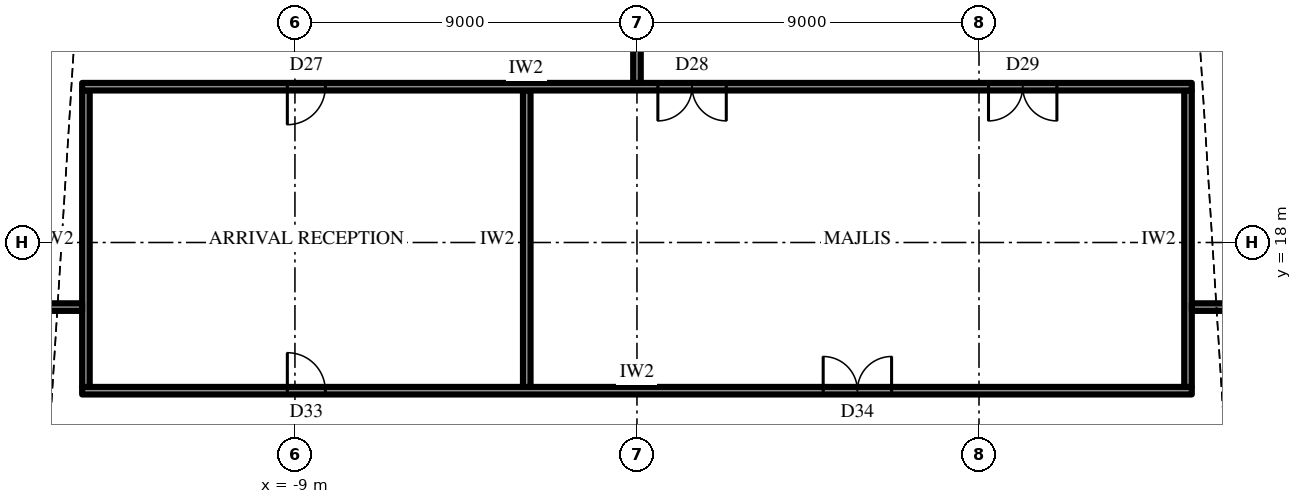
"""IFC4 building model, lengths in metres.
Left out: names, types, materials, properties, quantities, classifications, styles, units other than length and angle.
Written with IfcOpenShell. Run it as: python <this file> out.ifc"""

import sys

from ifc_helpers import new_model, si_unit, direction, frame, frame_2d, origin, place, context, subcontext, project, spatial, rectangle, extrude, element, fill, save


model = new_model("IFC4")
c1 = context("Model", 3, precision=1e-05, world=origin(), true_north=direction((0.0, 1.0)))
c2 = subcontext(c1, "Body", "Model", "MODEL_VIEW")
j1 = project(units=[si_unit("LENGTHUNIT", "METRE"), si_unit("PLANEANGLEUNIT", "RADIAN")], contexts=[c1])
p1 = place(None, origin())
s1 = spatial("IfcSite", under=j1, at=p1, CompositionType="ELEMENT")
p2 = place(p1, origin())
s2 = spatial("IfcBuilding", under=s1, at=p2, CompositionType="ELEMENT")
p3 = place(p2, frame((0.0, 0.0, 306.5)))
s3 = spatial("IfcBuildingStorey", under=s2, at=p3, CompositionType="ELEMENT", Elevation=306.5)
p4 = place(p3, frame((-14.6, 14.1, 0.0), z_axis=(0.0, 0.0, 1.0), x_axis=(1.0, 0.0, 0.0)))
e1 = element("IfcWall", 1, at=p4, inside=s3, PredefinedType="PARTITIONING", context=c2, shape_type="SweptSolid", body=[
    extrude(rectangle(XDim=29.2, YDim=0.2, at=frame_2d((14.6, 0.0))), origin(), (0.0, 0.0, 1.0), 4.8),
])
p5 = place(p4, frame((5.4, 0.0, 0.0)))
e2 = element("IfcOpeningElement", 2, at=p5, cuts=e1, PredefinedType="OPENING", context=c2, shape_type="SweptSolid", body=[
    extrude(rectangle(XDim=1.0, YDim=2.2, at=frame_2d((0.5, 1.1))), frame((0.0, 0.11, 0.0), z_axis=(0.0, -1.0, 0.0), x_axis=(1.0, 0.0, 0.0)), (0.0, 0.0, 1.0), 0.22),
])
p6 = place(p4, frame((19.5, 0.0, 0.0)))
e3 = element("IfcOpeningElement", 3, at=p6, cuts=e1, PredefinedType="OPENING", context=c2, shape_type="SweptSolid", body=[
    extrude(rectangle(XDim=1.8, YDim=2.4, at=frame_2d((0.9, 1.2))), frame((0.0, 0.11, 0.0), z_axis=(0.0, -1.0, 0.0), x_axis=(1.0, 0.0, 0.0)), (0.0, 0.0, 1.0), 0.22),
])
for number, where, z_axis, x_axis in (
    (4, (-14.5, 14.2, 0.0), (0.0, 0.0, 1.0), (0.0, 1.0, 0.0)),
    (5, (-2.9, 14.2, 0.0), (0.0, 0.0, 1.0), (0.0, 1.0, 0.0)),
    (6, (14.5, 14.2, 0.0), (0.0, 0.0, 1.0), (0.0, 1.0, 0.0)),
):
    element("IfcWall", number, at=place(p3, frame(where, z_axis=z_axis, x_axis=x_axis)), inside=s3, PredefinedType="PARTITIONING", context=c2, shape_type="SweptSolid", body=[
        extrude(rectangle(XDim=7.8, YDim=0.2, at=frame_2d((3.9, 0.0))), origin(), (0.0, 0.0, 1.0), 4.8),
    ])
p7 = place(p3, frame((-14.6, 22.1, 0.0), z_axis=(0.0, 0.0, 1.0), x_axis=(1.0, 0.0, 0.0)))
e7 = element("IfcWall", 7, at=p7, inside=s3, PredefinedType="PARTITIONING", context=c2, shape_type="SweptSolid", body=[
    extrude(rectangle(XDim=29.2, YDim=0.2, at=frame_2d((14.6, 0.0))), origin(), (0.0, 0.0, 1.0), 4.8),
])
p8 = place(p7, frame((5.4, 0.0, 0.0)))
e8 = element("IfcOpeningElement", 8, at=p8, cuts=e7, PredefinedType="OPENING", context=c2, shape_type="SweptSolid", body=[
    extrude(rectangle(XDim=1.0, YDim=2.2, at=frame_2d((0.5, 1.1))), frame((0.0, 0.11, 0.0), z_axis=(0.0, -1.0, 0.0), x_axis=(1.0, 0.0, 0.0)), (0.0, 0.0, 1.0), 0.22),
])
p9 = place(p7, frame((15.15, 0.0, 0.0)))
e9 = element("IfcOpeningElement", 9, at=p9, cuts=e7, PredefinedType="OPENING", context=c2, shape_type="SweptSolid", body=[
    extrude(rectangle(XDim=1.8, YDim=2.4, at=frame_2d((0.9, 1.2))), frame((0.0, 0.11, 0.0), z_axis=(0.0, -1.0, 0.0), x_axis=(1.0, 0.0, 0.0)), (0.0, 0.0, 1.0), 0.22),
])
p10 = place(p7, frame((23.85, 0.0, 0.0)))
e10 = element("IfcOpeningElement", 10, at=p10, cuts=e7, PredefinedType="OPENING", context=c2, shape_type="SweptSolid", body=[
    extrude(rectangle(XDim=1.8, YDim=2.4, at=frame_2d((0.9, 1.2))), frame((0.0, 0.11, 0.0), z_axis=(0.0, -1.0, 0.0), x_axis=(1.0, 0.0, 0.0)), (0.0, 0.0, 1.0), 0.22),
])
for number, where, z_axis, x_axis in (
    (11, (14.6, 16.3, 0.0), (0.0, 0.0, 1.0), (1.0, 0.0, 0.0)),
    (12, (-14.6, 16.3, 0.0), (0.0, 0.0, 1.0), (-1.0, 0.0, 0.0)),
):
    element("IfcWall", number, at=place(p3, frame(where, z_axis=z_axis, x_axis=x_axis)), inside=s3, PredefinedType="PARTITIONING", context=c2, shape_type="SweptSolid", body=[
        extrude(rectangle(XDim=4.8, YDim=0.2, at=frame_2d((2.4, 0.0))), origin(), (0.0, 0.0, 1.0), 4.8),
    ])
p11 = place(p3, frame((0.0, 22.2, 0.0), z_axis=(0.0, 0.0, 1.0), x_axis=(0.0, 1.0, 0.0)))
e13 = element("IfcWall", 13, at=p11, inside=s3, PredefinedType="PARTITIONING", context=c2, shape_type="SweptSolid", body=[
    extrude(rectangle(XDim=4.36, YDim=0.2, at=frame_2d((2.18, 0.0))), origin(), (0.0, 0.0, 1.0), 3.792),
])
p12 = place(p8, frame((1.0, 0.0, 0.0), z_axis=(0.0, 0.0, 1.0), x_axis=(-1.0, 0.0, 0.0)))
e14 = element("IfcDoor", 14, at=p12, inside=s3, OperationType="SINGLE_SWING_LEFT", PredefinedType="DOOR", context=c2, shape_type="SweptSolid", body=[
    extrude(rectangle(XDim=1.0, YDim=2.2, at=frame_2d((0.5, 1.1))), frame((0.0, 0.025, 0.0), z_axis=(0.0, -1.0, 0.0), x_axis=(1.0, 0.0, 0.0)), (0.0, 0.0, 1.0), 0.05),
])
fill(e8, e14)
p13 = place(p9, frame((1.8, 0.0, 0.0), z_axis=(0.0, 0.0, 1.0), x_axis=(-1.0, 0.0, 0.0)))
e15 = element("IfcDoor", 15, at=p13, inside=s3, OperationType="DOUBLE_DOOR_SINGLE_SWING", PredefinedType="DOOR", context=c2, shape_type="SweptSolid", body=[
    extrude(rectangle(XDim=1.8, YDim=2.4, at=frame_2d((0.9, 1.2))), frame((0.0, 0.025, 0.0), z_axis=(0.0, -1.0, 0.0), x_axis=(1.0, 0.0, 0.0)), (0.0, 0.0, 1.0), 0.05),
])
fill(e9, e15)
p14 = place(p10, frame((1.8, 0.0, 0.0), z_axis=(0.0, 0.0, 1.0), x_axis=(-1.0, 0.0, 0.0)))
e16 = element("IfcDoor", 16, at=p14, inside=s3, OperationType="DOUBLE_DOOR_SINGLE_SWING", PredefinedType="DOOR", context=c2, shape_type="SweptSolid", body=[
    extrude(rectangle(XDim=1.8, YDim=2.4, at=frame_2d((0.9, 1.2))), frame((0.0, 0.025, 0.0), z_axis=(0.0, -1.0, 0.0), x_axis=(1.0, 0.0, 0.0)), (0.0, 0.0, 1.0), 0.05),
])
fill(e10, e16)
p15 = place(p5, origin())
e17 = element("IfcDoor", 17, at=p15, inside=s3, OperationType="SINGLE_SWING_RIGHT", PredefinedType="DOOR", context=c2, shape_type="SweptSolid", body=[
    extrude(rectangle(XDim=1.0, YDim=2.2, at=frame_2d((0.5, 1.1))), frame((0.0, 0.025, 0.0), z_axis=(0.0, -1.0, 0.0), x_axis=(1.0, 0.0, 0.0)), (0.0, 0.0, 1.0), 0.05),
])
fill(e2, e17)
p16 = place(p6, origin())
e18 = element("IfcDoor", 18, at=p16, inside=s3, OperationType="DOUBLE_DOOR_SINGLE_SWING", PredefinedType="DOOR", context=c2, shape_type="SweptSolid", body=[
    extrude(rectangle(XDim=1.8, YDim=2.4, at=frame_2d((0.9, 1.2))), frame((0.0, 0.025, 0.0), z_axis=(0.0, -1.0, 0.0), x_axis=(1.0, 0.0, 0.0)), (0.0, 0.0, 1.0), 0.05),
])
fill(e3, e18)
save(model, sys.argv[1])
